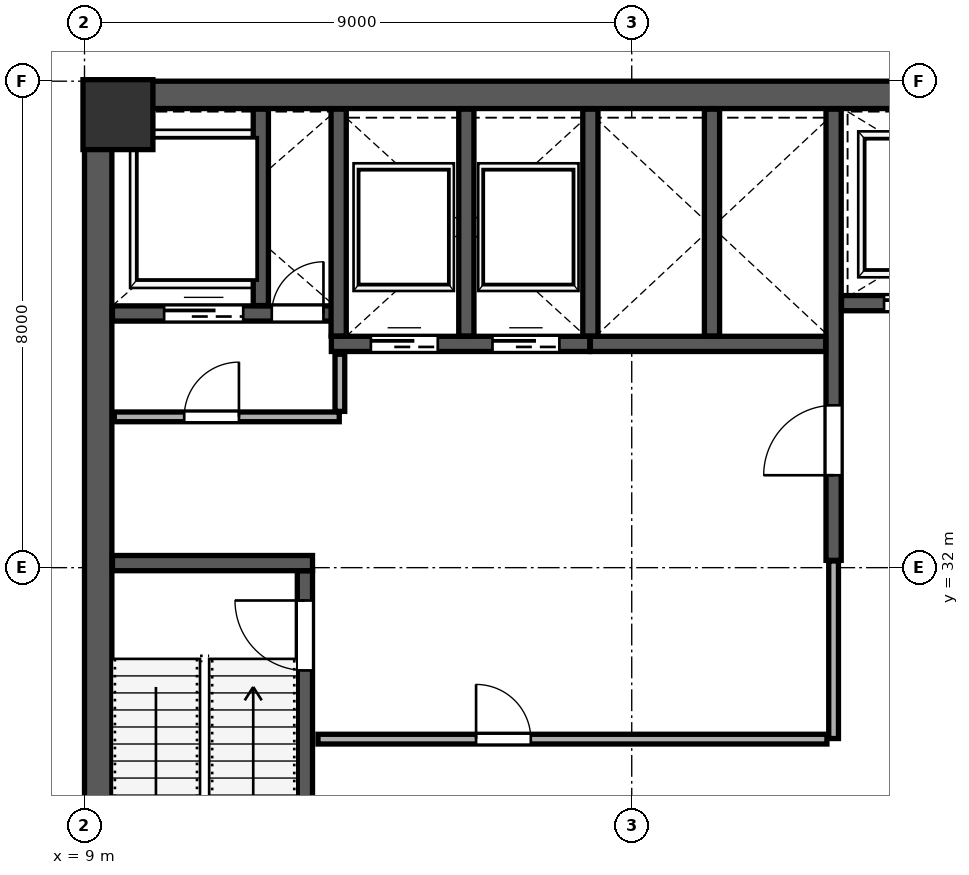
"""IFC4 building model, lengths in metres.
Left out: names, types, materials, properties, quantities, classifications, styles, units other than length and angle.
Written with IfcOpenShell. Run it as: python <this file> out.ifc"""

import sys

from ifc_helpers import new_model, si_unit, direction, frame, frame_2d, origin, origin_2d, place, context, subcontext, project, spatial, rectangle, extrude, source, transform, mapped, element, fill, save


model = new_model("IFC4")
c1 = context("Model", 3, precision=1e-05, world=origin(), true_north=direction((0.0, 1.0)))
c2 = subcontext(c1, "Body", "Model", "MODEL_VIEW")
j1 = project(units=[si_unit("LENGTHUNIT", "METRE"), si_unit("PLANEANGLEUNIT", "RADIAN")], contexts=[c1])
p1 = place(None, origin())
s1 = spatial("IfcSite", under=j1, at=p1, CompositionType="ELEMENT")
p2 = place(p1, origin())
s2 = spatial("IfcBuilding", under=s1, at=p2, CompositionType="ELEMENT")
p3 = place(p2, frame((0.0, 0.0, 170.8)))
s3 = spatial("IfcBuildingStorey", under=s2, at=p3, CompositionType="ELEMENT", Elevation=170.8)
m1 = source(origin(), c2, "Body", "SweptSolid", [
    extrude(rectangle(XDim=1.15, YDim=1.15, at=origin_2d()), origin(), (0.0, 0.0, 1.0), 4.198),
])
p4 = place(p3, frame((9.55, 39.45, 0.001), z_axis=(0.0, 0.0, 1.0), x_axis=(1.0, 0.0, 0.0)))
e1 = element("IfcColumn", 1, at=p4, inside=s3, PredefinedType="COLUMN", context=c2, shape_type="MappedRepresentation", body=[
    mapped(m1, transform((0.0, 0.0, 0.0), scale=1.0)),
])
p5 = place(p3, frame((9.225, 24.45, 0.0), z_axis=(0.0, 0.0, 1.0), x_axis=(0.0, 1.0, 0.0)))
e2 = element("IfcWall", 2, at=p5, inside=s3, PredefinedType="SHEAR", context=c2, shape_type="SweptSolid", body=[
    extrude(rectangle(XDim=15.1, YDim=0.45, at=frame_2d((7.55, 0.0))), origin(), (0.0, 0.0, 1.0), 3.96),
])
p6 = place(p3, frame((9.0, 39.775, 0.0), z_axis=(0.0, 0.0, 1.0), x_axis=(1.0, 0.0, 0.0)))
e3 = element("IfcWall", 3, at=p6, inside=s3, PredefinedType="SHEAR", context=c2, shape_type="SweptSolid", body=[
    extrude(rectangle(XDim=18.0, YDim=0.45, at=frame_2d((9.0, 0.0))), origin(), (0.0, 0.0, 1.0), 3.96),
])
p7 = place(p3, frame((12.625, 24.46, 0.0), z_axis=(0.0, 0.0, 1.0), x_axis=(0.0, 1.0, 0.0)))
e4 = element("IfcWall", 4, at=p7, inside=s3, PredefinedType="SHEAR", context=c2, shape_type="SweptSolid", body=[
    extrude(rectangle(XDim=7.49, YDim=0.25, at=frame_2d((3.745, 0.0))), origin(), (0.0, 0.0, 1.0), 3.96),
])
p8 = place(p7, frame((5.85, 0.0, 0.0)))
e5 = element("IfcOpeningElement", 5, at=p8, cuts=e4, PredefinedType="OPENING", context=c2, shape_type="SweptSolid", body=[
    extrude(rectangle(XDim=1.15, YDim=2.2, at=frame_2d((0.575, 1.1))), frame((0.0, 0.135, 0.0), z_axis=(0.0, -1.0, 0.0), x_axis=(1.0, 0.0, 0.0)), (0.0, 0.0, 1.0), 0.27),
])
p9 = place(p3, frame((9.46, 32.075, 0.0), z_axis=(0.0, 0.0, 1.0), x_axis=(1.0, 0.0, 0.0)))
e6 = element("IfcWall", 6, at=p9, inside=s3, PredefinedType="SHEAR", context=c2, shape_type="SweptSolid", body=[
    extrude(rectangle(XDim=3.29, YDim=0.25, at=frame_2d((1.645, 0.0))), origin(), (0.0, 0.0, 1.0), 3.96),
])
p10 = place(p3, frame((21.32, 32.12, 0.0), z_axis=(0.0, 0.0, 1.0), x_axis=(0.0, 1.0, 0.0)))
e7 = element("IfcWall", 7, at=p10, inside=s3, PredefinedType="SHEAR", context=c2, shape_type="SweptSolid", body=[
    extrude(rectangle(XDim=7.42, YDim=0.25, at=frame_2d((3.71, 0.0))), origin(), (0.0, 0.0, 1.0), 3.96),
])
p11 = place(p10, frame((1.4, 0.0, 0.0)))
e8 = element("IfcOpeningElement", 8, at=p11, cuts=e7, PredefinedType="OPENING", context=c2, shape_type="SweptSolid", body=[
    extrude(rectangle(XDim=1.15, YDim=2.2, at=frame_2d((0.575, 1.1))), frame((0.0, 0.135, 0.0), z_axis=(0.0, -1.0, 0.0), x_axis=(1.0, 0.0, 0.0)), (0.0, 0.0, 1.0), 0.27),
])
p12 = place(p3, frame((9.46, 36.18, 0.0), z_axis=(0.0, 0.0, 1.0), x_axis=(1.0, 0.0, 0.0)))
e9 = element("IfcWall", 9, at=p12, inside=s3, PredefinedType="SHEAR", context=c2, shape_type="SweptSolid", body=[
    extrude(rectangle(XDim=3.79, YDim=0.25, at=frame_2d((1.895, 0.0))), origin(), (0.0, 0.0, 1.0), 3.96),
])
p13 = place(p12, frame((2.62, 0.0, 0.0)))
e10 = element("IfcOpeningElement", 10, at=p13, cuts=e9, PredefinedType="OPENING", context=c2, shape_type="SweptSolid", body=[
    extrude(rectangle(XDim=0.85, YDim=2.1, at=frame_2d((0.425, 1.05))), frame((0.0, 0.135, 0.0), z_axis=(0.0, -1.0, 0.0), x_axis=(1.0, 0.0, 0.0)), (0.0, 0.0, 1.0), 0.27),
])
p14 = place(p12, frame((0.85, 0.0, 0.0)))
e11 = element("IfcOpeningElement", 11, at=p14, cuts=e9, PredefinedType="OPENING", context=c2, shape_type="SweptSolid", body=[
    extrude(rectangle(XDim=1.3, YDim=2.25, at=frame_2d((0.65, 1.125))), frame((0.0, 0.135, 0.0), z_axis=(0.0, -1.0, 0.0), x_axis=(1.0, 0.0, 0.0)), (0.0, 0.0, 1.0), 0.27),
])
p15 = place(p3, frame((11.9, 36.31, 0.0), z_axis=(0.0, 0.0, 1.0), x_axis=(0.0, 1.0, 0.0)))
e12 = element("IfcWall", 12, at=p15, inside=s3, PredefinedType="SHEAR", context=c2, shape_type="SweptSolid", body=[
    extrude(rectangle(XDim=3.23, YDim=0.25, at=frame_2d((1.615, 0.0))), origin(), (0.0, 0.0, 1.0), 3.96),
])
p16 = place(p3, frame((21.45, 36.35, 0.0), z_axis=(0.0, 0.0, 1.0), x_axis=(1.0, 0.0, 0.0)))
e13 = element("IfcWall", 13, at=p16, inside=s3, PredefinedType="SHEAR", context=c2, shape_type="SweptSolid", body=[
    extrude(rectangle(XDim=5.09, YDim=0.25, at=frame_2d((2.545, 0.0))), origin(), (0.0, 0.0, 1.0), 3.96),
])
p17 = place(p16, frame((0.7, 0.0, 0.0)))
e14 = element("IfcOpeningElement", 14, at=p17, cuts=e13, PredefinedType="OPENING", context=c2, shape_type="SweptSolid", body=[
    extrude(rectangle(XDim=1.2, YDim=2.2, at=frame_2d((0.6, 1.1))), frame((0.0, 0.135, 0.0), z_axis=(0.0, -1.0, 0.0), x_axis=(1.0, 0.0, 0.0)), (0.0, 0.0, 1.0), 0.27),
])
p18 = place(p16, frame((3.25, 0.0, 0.0)))
e15 = element("IfcOpeningElement", 15, at=p18, cuts=e13, PredefinedType="OPENING", context=c2, shape_type="SweptSolid", body=[
    extrude(rectangle(XDim=1.2, YDim=2.2, at=frame_2d((0.6, 1.1))), frame((0.0, 0.135, 0.0), z_axis=(0.0, -1.0, 0.0), x_axis=(1.0, 0.0, 0.0)), (0.0, 0.0, 1.0), 0.27),
])
p19 = place(p3, frame((13.06, 35.68, 0.0), z_axis=(0.0, 0.0, 1.0), x_axis=(1.0, 0.0, 0.0)))
e16 = element("IfcWall", 16, at=p19, inside=s3, PredefinedType="SHEAR", context=c2, shape_type="SweptSolid", body=[
    extrude(rectangle(XDim=4.25, YDim=0.25, at=frame_2d((2.125, 0.0))), origin(), (0.0, 0.0, 1.0), 3.96),
])
p20 = place(p19, frame((0.65, 0.0, 0.0)))
e17 = element("IfcOpeningElement", 17, at=p20, cuts=e16, PredefinedType="OPENING", context=c2, shape_type="SweptSolid", body=[
    extrude(rectangle(XDim=1.1, YDim=2.2, at=frame_2d((0.55, 1.1))), frame((0.0, 0.135, 0.0), z_axis=(0.0, -1.0, 0.0), x_axis=(1.0, 0.0, 0.0)), (0.0, 0.0, 1.0), 0.27),
])
p21 = place(p19, frame((2.65, 0.0, 0.0)))
e18 = element("IfcOpeningElement", 18, at=p21, cuts=e16, PredefinedType="OPENING", context=c2, shape_type="SweptSolid", body=[
    extrude(rectangle(XDim=1.1, YDim=2.2, at=frame_2d((0.55, 1.1))), frame((0.0, 0.135, 0.0), z_axis=(0.0, -1.0, 0.0), x_axis=(1.0, 0.0, 0.0)), (0.0, 0.0, 1.0), 0.27),
])
for number, where, z_axis, x_axis in (
    (19, (13.18, 35.81, 0.0), (0.0, 0.0, 1.0), (0.0, 1.0, 0.0)),
    (20, (15.28, 35.81, 0.0), (0.0, 0.0, 1.0), (0.0, 1.0, 0.0)),
):
    element("IfcWall", number, at=place(p3, frame(where, z_axis=z_axis, x_axis=x_axis)), inside=s3, PredefinedType="SHEAR", context=c2, shape_type="SweptSolid", body=[
        extrude(rectangle(XDim=3.73, YDim=0.25, at=frame_2d((1.865, 0.0))), origin(), (0.0, 0.0, 1.0), 3.96),
    ])
p22 = place(p3, frame((17.32, 35.68, 0.0), z_axis=(0.0, 0.0, 1.0), x_axis=(1.0, 0.0, 0.0)))
e21 = element("IfcWall", 21, at=p22, inside=s3, PredefinedType="SHEAR", context=c2, shape_type="SweptSolid", body=[
    extrude(rectangle(XDim=3.87, YDim=0.25, at=frame_2d((1.935, 0.0))), origin(), (0.0, 0.0, 1.0), 3.96),
])
for number, where, z_axis, x_axis in (
    (22, (17.32, 35.81, 0.0), (0.0, 0.0, 1.0), (0.0, 1.0, 0.0)),
    (23, (19.32, 35.81, 0.0), (0.0, 0.0, 1.0), (0.0, 1.0, 0.0)),
):
    element("IfcWall", number, at=place(p3, frame(where, z_axis=z_axis, x_axis=x_axis)), inside=s3, PredefinedType="SHEAR", context=c2, shape_type="SweptSolid", body=[
        extrude(rectangle(XDim=3.73, YDim=0.25, at=frame_2d((1.865, 0.0))), origin(), (0.0, 0.0, 1.0), 3.96),
    ])
p23 = place(p3, frame((9.49, 34.48, 0.0), z_axis=(0.0, 0.0, 1.0), x_axis=(1.0, 0.0, 0.0)))
e24 = element("IfcWall", 24, at=p23, inside=s3, PredefinedType="PARTITIONING", context=c2, shape_type="SweptSolid", body=[
    extrude(rectangle(XDim=3.7, YDim=0.16, at=frame_2d((1.85, 0.0))), origin(), (0.0, 0.0, 1.0), 3.96),
])
p24 = place(p23, frame((1.15, 0.0, 0.0)))
e25 = element("IfcOpeningElement", 25, at=p24, cuts=e24, PredefinedType="OPENING", context=c2, shape_type="SweptSolid", body=[
    extrude(rectangle(XDim=0.9, YDim=2.15, at=frame_2d((0.45, 1.075))), frame((0.0, 0.09, 0.0), z_axis=(0.0, -1.0, 0.0), x_axis=(1.0, 0.0, 0.0)), (0.0, 0.0, 1.0), 0.18),
])
p25 = place(p3, frame((13.2, 34.57, 0.0), z_axis=(0.0, 0.0, 1.0), x_axis=(0.0, 1.0, 0.0)))
e26 = element("IfcWall", 26, at=p25, inside=s3, PredefinedType="PARTITIONING", context=c2, shape_type="SweptSolid", body=[
    extrude(rectangle(XDim=0.94, YDim=0.16, at=frame_2d((0.47, 0.0))), origin(), (0.0, 0.0, 1.0), 3.96),
])
p26 = place(p3, frame((12.84, 29.18, 0.0), z_axis=(0.0, 0.0, 1.0), x_axis=(1.0, 0.0, 0.0)))
e27 = element("IfcWall", 27, at=p26, inside=s3, PredefinedType="PARTITIONING", context=c2, shape_type="SweptSolid", body=[
    extrude(rectangle(XDim=8.37, YDim=0.16, at=frame_2d((4.185, 0.0))), origin(), (0.0, 0.0, 1.0), 3.96),
])
p27 = place(p26, frame((2.6, 0.0, 0.0)))
e28 = element("IfcOpeningElement", 28, at=p27, cuts=e27, PredefinedType="OPENING", context=c2, shape_type="SweptSolid", body=[
    extrude(rectangle(XDim=0.9, YDim=2.15, at=frame_2d((0.45, 1.075))), frame((0.0, 0.09, 0.0), z_axis=(0.0, -1.0, 0.0), x_axis=(1.0, 0.0, 0.0)), (0.0, 0.0, 1.0), 0.18),
])
p28 = place(p3, frame((21.32, 29.19, 0.0), z_axis=(0.0, 0.0, 1.0), x_axis=(0.0, 1.0, 0.0)))
e29 = element("IfcWall", 29, at=p28, inside=s3, PredefinedType="PARTITIONING", context=c2, shape_type="SweptSolid", body=[
    extrude(rectangle(XDim=2.92, YDim=0.16, at=frame_2d((1.46, 0.0))), origin(), (0.0, 0.0, 1.0), 3.96),
])
p29 = place(p3, frame((11.104, 49.971, 0.0), z_axis=(0.0, 0.0, 1.0), x_axis=(0.887010001249, -0.461750211353, 0.0)))
e30 = element("IfcWall", 30, at=p29, inside=s3, PredefinedType="PARTITIONING", context=c2, shape_type="SweptSolid", body=[
    extrude(rectangle(XDim=28.02, YDim=0.135, at=frame_2d((14.01, 0.0))), origin(), (0.0, 0.0, 1.0), 3.96),
])
p30 = place(p29, frame((20.31, 0.0, 0.0)))
e31 = element("IfcOpeningElement", 31, at=p30, cuts=e30, PredefinedType="OPENING", context=c2, shape_type="SweptSolid", body=[
    extrude(rectangle(XDim=0.95, YDim=2.15, at=frame_2d((0.475, 1.075))), frame((0.0, 0.078, 0.0), z_axis=(0.0, -1.0, 0.0), x_axis=(1.0, 0.0, 0.0)), (0.0, 0.0, 1.0), 0.155),
])
m2 = source(origin(), c2, "Body", "SweptSolid", [
    extrude(rectangle(XDim=1.15, YDim=2.2, at=frame_2d((0.575, 1.1))), frame((0.0, 0.025, 0.0), z_axis=(0.0, -1.0, 0.0), x_axis=(1.0, 0.0, 0.0)), (0.0, 0.0, 1.0), 0.05),
])
p31 = place(p8, origin())
e32 = element("IfcDoor", 32, at=p31, inside=s3, OperationType="SINGLE_SWING_RIGHT", PredefinedType="DOOR", context=c2, shape_type="MappedRepresentation", body=[
    mapped(m2, transform((0.0, 0.0, 0.0), scale=1.0)),
])
fill(e5, e32)
m3 = source(origin(), c2, "Body", "SweptSolid", [
    extrude(rectangle(XDim=1.15, YDim=2.2, at=frame_2d((0.575, 1.1))), frame((0.0, 0.025, 0.0), z_axis=(0.0, -1.0, 0.0), x_axis=(1.0, 0.0, 0.0)), (0.0, 0.0, 1.0), 0.05),
])
p32 = place(p11, origin())
e33 = element("IfcDoor", 33, at=p32, inside=s3, OperationType="SINGLE_SWING_LEFT", PredefinedType="DOOR", context=c2, shape_type="MappedRepresentation", body=[
    mapped(m3, transform((0.0, 0.0, 0.0), scale=1.0)),
])
fill(e8, e33)
m4 = source(origin(), c2, "Body", "SweptSolid", [
    extrude(rectangle(XDim=0.85, YDim=2.1, at=frame_2d((0.425, 1.05))), frame((0.0, 0.025, 0.0), z_axis=(0.0, -1.0, 0.0), x_axis=(1.0, 0.0, 0.0)), (0.0, 0.0, 1.0), 0.05),
])
p33 = place(p13, origin())
e34 = element("IfcDoor", 34, at=p33, inside=s3, OperationType="SINGLE_SWING_RIGHT", PredefinedType="DOOR", context=c2, shape_type="MappedRepresentation", body=[
    mapped(m4, transform((0.0, 0.0, 0.0), scale=1.0)),
])
fill(e10, e34)
m5 = source(origin(), c2, "Body", "SweptSolid", [
    extrude(rectangle(XDim=1.1, YDim=2.2, at=frame_2d((0.55, 1.1))), frame((0.0, 0.025, 0.0), z_axis=(0.0, -1.0, 0.0), x_axis=(1.0, 0.0, 0.0)), (0.0, 0.0, 1.0), 0.05),
])
p34 = place(p20, origin())
e35 = element("IfcDoor", 35, at=p34, inside=s3, OperationType="SLIDING_TO_LEFT", PredefinedType="DOOR", context=c2, shape_type="MappedRepresentation", body=[
    mapped(m5, transform((0.0, 0.0, 0.0), scale=1.0)),
])
fill(e17, e35)
p35 = place(p21, origin())
e36 = element("IfcDoor", 36, at=p35, inside=s3, OperationType="SLIDING_TO_RIGHT", PredefinedType="DOOR", context=c2, shape_type="MappedRepresentation", body=[
    mapped(m5, transform((0.0, 0.0, 0.0), scale=1.0)),
])
fill(e18, e36)
m6 = source(origin(), c2, "Body", "SweptSolid", [
    extrude(rectangle(XDim=1.2, YDim=2.2, at=frame_2d((0.6, 1.1))), frame((0.0, 0.025, 0.0), z_axis=(0.0, -1.0, 0.0), x_axis=(1.0, 0.0, 0.0)), (0.0, 0.0, 1.0), 0.05),
])
p36 = place(p17, origin())
e37 = element("IfcDoor", 37, at=p36, inside=s3, OperationType="SLIDING_TO_LEFT", PredefinedType="DOOR", context=c2, shape_type="MappedRepresentation", body=[
    mapped(m6, transform((0.0, 0.0, 0.0), scale=1.0)),
])
fill(e14, e37)
m7 = source(origin(), c2, "Body", "SweptSolid", [
    extrude(rectangle(XDim=1.3, YDim=2.25, at=frame_2d((0.65, 1.125))), frame((0.0, 0.025, 0.0), z_axis=(0.0, -1.0, 0.0), x_axis=(1.0, 0.0, 0.0)), (0.0, 0.0, 1.0), 0.05),
])
p37 = place(p14, origin())
e38 = element("IfcDoor", 38, at=p37, inside=s3, OperationType="SLIDING_TO_LEFT", PredefinedType="DOOR", context=c2, shape_type="MappedRepresentation", body=[
    mapped(m7, transform((0.0, 0.0, 0.0), scale=1.0)),
])
fill(e11, e38)
m8 = source(origin(), c2, "Body", "SweptSolid", [
    extrude(rectangle(XDim=0.9, YDim=2.15, at=frame_2d((0.45, 1.075))), frame((0.0, 0.025, 0.0), z_axis=(0.0, -1.0, 0.0), x_axis=(1.0, 0.0, 0.0)), (0.0, 0.0, 1.0), 0.05),
])
p38 = place(p24, origin())
e39 = element("IfcDoor", 39, at=p38, inside=s3, OperationType="SINGLE_SWING_RIGHT", PredefinedType="DOOR", context=c2, shape_type="MappedRepresentation", body=[
    mapped(m8, transform((0.0, 0.0, 0.0), scale=1.0)),
])
fill(e25, e39)
p39 = place(p27, origin())
e40 = element("IfcDoor", 40, at=p39, inside=s3, OperationType="SINGLE_SWING_LEFT", PredefinedType="DOOR", context=c2, shape_type="MappedRepresentation", body=[
    mapped(m8, transform((0.0, 0.0, 0.0), scale=1.0)),
])
fill(e28, e40)
save(model, sys.argv[1])
